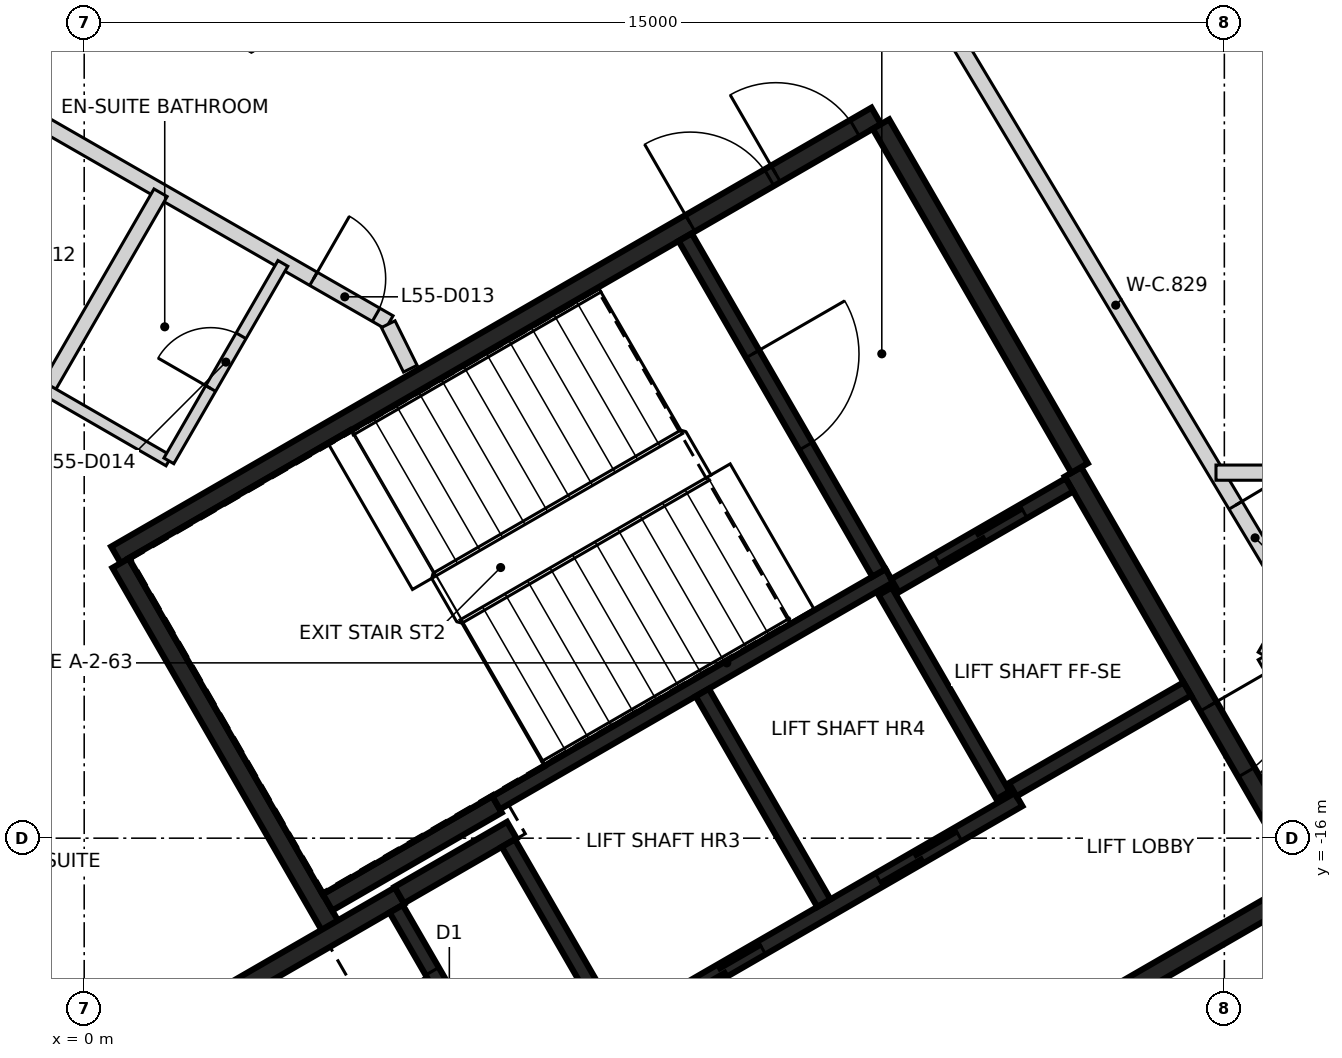
"""IFC4 building model, lengths in metres.
Left out: names, types, materials, properties, quantities, classifications, styles, units other than length and angle.
Written with IfcOpenShell. Run it as: python <this file> out.ifc"""

import sys

from ifc_helpers import new_model, si_unit, direction, frame, frame_2d, origin, place, context, subcontext, project, spatial, rectangle, extrude, element, fill, save


model = new_model("IFC4")
c1 = context("Model", 3, precision=1e-05, world=origin(), true_north=direction((0.0, 1.0)))
c2 = subcontext(c1, "Body", "Model", "MODEL_VIEW")
j1 = project(units=[si_unit("LENGTHUNIT", "METRE"), si_unit("PLANEANGLEUNIT", "RADIAN")], contexts=[c1])
p1 = place(None, origin())
s1 = spatial("IfcSite", under=j1, at=p1, CompositionType="ELEMENT")
p2 = place(p1, origin())
s2 = spatial("IfcBuilding", under=s1, at=p2, CompositionType="ELEMENT")
p3 = place(p2, frame((0.0, 0.0, 221.4)))
s3 = spatial("IfcBuildingStorey", under=s2, at=p3, CompositionType="ELEMENT", Elevation=221.4)
p4 = place(p3, frame((0.417, -12.273, 0.0), z_axis=(0.0, 0.0, 1.0), x_axis=(0.866021906294, 0.500006057782, 0.0)))
e1 = element("IfcWall", 1, at=p4, inside=s3, PredefinedType="SHEAR", context=c2, shape_type="SweptSolid", body=[
    extrude(rectangle(XDim=11.55, YDim=0.25, at=frame_2d((5.775, 0.0))), origin(), (0.0, 0.0, 1.0), 3.25),
])
p5 = place(p4, frame((10.025, 0.0, 0.0)))
e2 = element("IfcOpeningElement", 2, at=p5, cuts=e1, PredefinedType="OPENING", context=c2, shape_type="SweptSolid", body=[
    extrude(rectangle(XDim=1.2, YDim=2.1, at=frame_2d((0.6, 1.05))), frame((0.0, 0.135, 0.0), z_axis=(0.0, -1.0, 0.0), x_axis=(1.0, 0.0, 0.0)), (0.0, 0.0, 1.0), 0.27),
])
p6 = place(p4, frame((8.725, 0.0, 0.0)))
e3 = element("IfcOpeningElement", 3, at=p6, cuts=e1, PredefinedType="OPENING", context=c2, shape_type="SweptSolid", body=[
    extrude(rectangle(XDim=1.2, YDim=2.1, at=frame_2d((0.6, 1.05))), frame((0.0, 0.135, 0.0), z_axis=(0.0, -1.0, 0.0), x_axis=(1.0, 0.0, 0.0)), (0.0, 0.0, 1.0), 0.27),
])
p7 = place(p3, frame((16.133, -16.594, 0.0), z_axis=(0.0, 0.0, 1.0), x_axis=(-0.866022959057, -0.500004234368, 0.0)))
e4 = element("IfcWall", 4, at=p7, inside=s3, PredefinedType="SHEAR", context=c2, shape_type="SweptSolid", body=[
    extrude(rectangle(XDim=8.75, YDim=0.25, at=frame_2d((4.375, 0.0))), origin(), (0.0, 0.0, 1.0), 3.25),
])
p8 = place(p3, frame((13.008, -11.181, 0.0), z_axis=(0.0, 0.0, 1.0), x_axis=(0.500001955336, -0.866024274868, 0.0)))
e5 = element("IfcWall", 5, at=p8, inside=s3, PredefinedType="SHEAR", context=c2, shape_type="SweptSolid", body=[
    extrude(rectangle(XDim=6.125, YDim=0.25, at=frame_2d((3.062, 0.0))), origin(), (0.0, 0.0, 1.0), 3.25),
])
p9 = place(p8, frame((3.563, 0.0, 0.0)))
e6 = element("IfcOpeningElement", 6, at=p9, cuts=e5, PredefinedType="OPENING", context=c2, shape_type="SweptSolid", body=[
    extrude(rectangle(XDim=1.0, YDim=2.1, at=frame_2d((0.5, 1.05))), frame((0.0, 0.135, 0.0), z_axis=(0.0, -1.0, 0.0), x_axis=(1.0, 0.0, 0.0)), (0.0, 0.0, 1.0), 0.27),
])
p10 = place(p3, frame((3.235, -17.153, 0.0), z_axis=(0.0, 0.0, 1.0), x_axis=(-0.500008851346, 0.866020293397, 0.0)))
e7 = element("IfcWall", 7, at=p10, inside=s3, PredefinedType="SHEAR", context=c2, shape_type="SweptSolid", body=[
    extrude(rectangle(XDim=5.51, YDim=0.25, at=frame_2d((2.755, 0.0))), origin(), (0.0, 0.0, 1.0), 3.25),
])
p11 = place(p3, frame((10.483, -6.606, 0.0), z_axis=(0.0, 0.0, 1.0), x_axis=(0.49999885962, -0.866026062182, 0.0)))
e8 = element("IfcWall", 8, at=p11, inside=s3, PredefinedType="SHEAR", context=c2, shape_type="SweptSolid", body=[
    extrude(rectangle(XDim=5.225, YDim=0.25, at=frame_2d((2.612, 0.0))), origin(), (0.0, 0.0, 1.0), 3.25),
])
p12 = place(p3, frame((1.669, -18.19, 0.0), z_axis=(0.0, 0.0, 1.0), x_axis=(0.866042235819, 0.499970844928, 0.0)))
e9 = element("IfcWall", 9, at=p12, inside=s3, PredefinedType="SHEAR", context=c2, shape_type="SweptSolid", body=[
    extrude(rectangle(XDim=2.865, YDim=0.25, at=frame_2d((1.432, 0.0))), origin(), (0.0, 0.0, 1.0), 3.25),
])
p13 = place(p3, frame((5.431, -15.556, 0.0), z_axis=(0.0, 0.0, 1.0), x_axis=(-0.866022940537, -0.500004266446, 0.0)))
e10 = element("IfcWall", 10, at=p13, inside=s3, PredefinedType="SHEAR", context=c2, shape_type="SweptSolid", body=[
    extrude(rectangle(XDim=2.575, YDim=0.25, at=frame_2d((1.287, 0.0))), origin(), (0.0, 0.0, 1.0), 3.25),
])
p14 = place(p3, frame((4.145, -16.749, 0.0), z_axis=(0.0, 0.0, 1.0), x_axis=(0.866038183914, 0.499977863513, 0.0)))
e11 = element("IfcWall", 11, at=p14, inside=s3, PredefinedType="SHEAR", context=c2, shape_type="SweptSolid", body=[
    extrude(rectangle(XDim=1.71, YDim=0.25, at=frame_2d((0.855, 0.0))), origin(), (0.0, 0.0, 1.0), 3.25),
])
p15 = place(p3, frame((5.419, -15.534, 0.0), z_axis=(0.0, 0.0, 1.0), x_axis=(0.866029065029, 0.499993658486, 0.0)))
e12 = element("IfcWall", 12, at=p15, inside=s3, PredefinedType="SHEAR", context=c2, shape_type="SweptSolid", body=[
    extrude(rectangle(XDim=5.974, YDim=0.2, at=frame_2d((2.987, 0.0))), origin(), (0.0, 0.0, 1.0), 3.25),
])
p16 = place(p3, frame((7.01, -18.542, 0.0), z_axis=(0.0, 0.0, 1.0), x_axis=(0.866030299012, 0.499991521122, 0.0)))
e13 = element("IfcWall", 13, at=p16, inside=s3, PredefinedType="SHEAR", context=c2, shape_type="SweptSolid", body=[
    extrude(rectangle(XDim=6.1, YDim=0.2, at=frame_2d((3.05, 0.0))), origin(), (0.0, 0.0, 1.0), 3.25),
])
p17 = place(p16, frame((1.0, 0.0, 0.0)))
e14 = element("IfcOpeningElement", 14, at=p17, cuts=e13, PredefinedType="OPENING", context=c2, shape_type="SweptSolid", body=[
    extrude(rectangle(XDim=1.2, YDim=2.1, at=frame_2d((0.6, 1.05))), frame((0.0, 0.11, 0.0), z_axis=(0.0, -1.0, 0.0), x_axis=(1.0, 0.0, 0.0)), (0.0, 0.0, 1.0), 0.22),
])
p18 = place(p16, frame((3.982, 0.0, 0.0)))
e15 = element("IfcOpeningElement", 15, at=p18, cuts=e13, PredefinedType="OPENING", context=c2, shape_type="SweptSolid", body=[
    extrude(rectangle(XDim=1.2, YDim=2.1, at=frame_2d((0.6, 1.05))), frame((0.0, 0.11, 0.0), z_axis=(0.0, -1.0, 0.0), x_axis=(1.0, 0.0, 0.0)), (0.0, 0.0, 1.0), 0.22),
])
p19 = place(p3, frame((7.906, -8.094, 0.0), z_axis=(0.0, 0.0, 1.0), x_axis=(0.500027839223, -0.866009330205, 0.0)))
e16 = element("IfcWall", 16, at=p19, inside=s3, PredefinedType="SHEAR", context=c2, shape_type="SweptSolid", body=[
    extrude(rectangle(XDim=5.098, YDim=0.2, at=frame_2d((2.549, 0.0))), origin(), (0.0, 0.0, 1.0), 3.25),
])
p20 = place(p19, frame((1.774, 0.0, 0.0)))
e17 = element("IfcOpeningElement", 17, at=p20, cuts=e16, PredefinedType="OPENING", context=c2, shape_type="SweptSolid", body=[
    extrude(rectangle(XDim=1.4, YDim=2.1, at=frame_2d((0.7, 1.05))), frame((0.0, 0.11, 0.0), z_axis=(0.0, -1.0, 0.0), x_axis=(1.0, 0.0, 0.0)), (0.0, 0.0, 1.0), 0.22),
])
p21 = place(p3, frame((8.132, -14.084, 0.0), z_axis=(0.0, 0.0, 1.0), x_axis=(0.499997778408, -0.866026686418, 0.0)))
e18 = element("IfcWall", 18, at=p21, inside=s3, PredefinedType="SHEAR", context=c2, shape_type="SweptSolid", body=[
    extrude(rectangle(XDim=3.198, YDim=0.2, at=frame_2d((1.599, 0.0))), origin(), (0.0, 0.0, 1.0), 3.25),
])
p22 = place(p3, frame((5.503, -19.352, 0.0), z_axis=(0.0, 0.0, 1.0), x_axis=(-0.499986818241, 0.866033014143, 0.0)))
e19 = element("IfcWall", 19, at=p22, inside=s3, PredefinedType="SHEAR", context=c2, shape_type="SweptSolid", body=[
    extrude(rectangle(XDim=2.798, YDim=0.2, at=frame_2d((1.399, 0.0))), origin(), (0.0, 0.0, 1.0), 3.25),
])
p23 = place(p22, frame((0.949, 0.0, 0.0)))
e20 = element("IfcOpeningElement", 20, at=p23, cuts=e19, PredefinedType="OPENING", context=c2, shape_type="SweptSolid", body=[
    extrude(rectangle(XDim=0.9, YDim=2.1, at=frame_2d((0.45, 1.05))), frame((0.0, 0.11, 0.0), z_axis=(0.0, -1.0, 0.0), x_axis=(1.0, 0.0, 0.0)), (0.0, 0.0, 1.0), 0.22),
])
p24 = place(p3, frame((6.96, -18.455, 0.0), z_axis=(0.0, 0.0, 1.0), x_axis=(-0.499926705758, 0.866067716099, 0.0)))
e21 = element("IfcWall", 21, at=p24, inside=s3, PredefinedType="SHEAR", context=c2, shape_type="SweptSolid", body=[
    extrude(rectangle(XDim=2.759, YDim=0.2, at=frame_2d((1.38, 0.0))), origin(), (0.0, 0.0, 1.0), 3.25),
])
p25 = place(p3, frame((12.088, -15.437, 0.0), z_axis=(0.0, 0.0, 1.0), x_axis=(-0.500026960575, 0.86600983753, 0.0)))
e22 = element("IfcWall", 22, at=p25, inside=s3, PredefinedType="SHEAR", context=c2, shape_type="SweptSolid", body=[
    extrude(rectangle(XDim=3.1, YDim=0.2, at=frame_2d((1.55, 0.0))), origin(), (0.0, 0.0, 1.0), 3.25),
])
p26 = place(p3, frame((10.666, -12.678, 0.0), z_axis=(0.0, 0.0, 1.0), x_axis=(0.866018407898, 0.500012117035, 0.0)))
e23 = element("IfcWall", 23, at=p26, inside=s3, PredefinedType="SHEAR", context=c2, shape_type="SweptSolid", body=[
    extrude(rectangle(XDim=2.651, YDim=0.2, at=frame_2d((1.325, 0.0))), origin(), (0.0, 0.0, 1.0), 3.25),
])
p27 = place(p26, frame((0.652, 0.0, 0.0)))
e24 = element("IfcOpeningElement", 24, at=p27, cuts=e23, PredefinedType="OPENING", context=c2, shape_type="SweptSolid", body=[
    extrude(rectangle(XDim=1.3, YDim=2.1, at=frame_2d((0.65, 1.05))), frame((0.0, 0.11, 0.0), z_axis=(0.0, -1.0, 0.0), x_axis=(1.0, 0.0, 0.0)), (0.0, 0.0, 1.0), 0.22),
])
p28 = place(p3, frame((14.512, -14.037, 0.0), z_axis=(0.0, 0.0, 1.0), x_axis=(-0.866018407898, -0.500012117035, 0.0)))
e25 = element("IfcWall", 25, at=p28, inside=s3, PredefinedType="SHEAR", context=c2, shape_type="SweptSolid", body=[
    extrude(rectangle(XDim=2.651, YDim=0.2, at=frame_2d((1.325, 0.0))), origin(), (0.0, 0.0, 1.0), 3.25),
])
p29 = place(p3, frame((-7.089, -2.836, 0.0), z_axis=(0.0, 0.0, 1.0), x_axis=(0.867106243364, -0.498123240493, 0.0)))
e26 = element("IfcWall", 26, at=p29, inside=s3, PredefinedType="PARTITIONING", context=c2, shape_type="SweptSolid", body=[
    extrude(rectangle(XDim=12.804, YDim=0.2, at=frame_2d((6.402, 0.0))), origin(), (0.0, 0.0, 1.0), 3.25),
])
p30 = place(p29, frame((1.909, 0.0, 0.0)))
e27 = element("IfcOpeningElement", 27, at=p30, cuts=e26, PredefinedType="OPENING", context=c2, shape_type="SweptSolid", body=[
    extrude(rectangle(XDim=1.0, YDim=2.1, at=frame_2d((0.5, 1.05))), frame((0.0, 0.11, 0.0), z_axis=(0.0, -1.0, 0.0), x_axis=(1.0, 0.0, 0.0)), (0.0, 0.0, 1.0), 0.22),
])
p31 = place(p29, frame((4.91, 0.0, 0.0)))
e28 = element("IfcOpeningElement", 28, at=p31, cuts=e26, PredefinedType="OPENING", context=c2, shape_type="SweptSolid", body=[
    extrude(rectangle(XDim=0.95, YDim=2.1, at=frame_2d((0.475, 1.05))), frame((0.0, 0.11, 0.0), z_axis=(0.0, -1.0, 0.0), x_axis=(1.0, 0.0, 0.0)), (0.0, 0.0, 1.0), 0.22),
])
p32 = place(p29, frame((11.654, 0.0, 0.0)))
e29 = element("IfcOpeningElement", 29, at=p32, cuts=e26, PredefinedType="OPENING", context=c2, shape_type="SweptSolid", body=[
    extrude(rectangle(XDim=0.95, YDim=2.1, at=frame_2d((0.475, 1.05))), frame((0.0, 0.11, 0.0), z_axis=(0.0, -1.0, 0.0), x_axis=(1.0, 0.0, 0.0)), (0.0, 0.0, 1.0), 0.22),
])
p33 = place(p3, frame((4.0, -9.238, 0.0), z_axis=(0.0, 0.0, 1.0), x_axis=(0.444370954227, -0.89584287408, 0.0)))
e30 = element("IfcWall", 30, at=p33, inside=s3, PredefinedType="PARTITIONING", context=c2, shape_type="SweptSolid", body=[
    extrude(rectangle(XDim=0.653, YDim=0.2, at=frame_2d((0.327, 0.0))), origin(), (0.0, 0.0, 1.0), 3.25),
])
p34 = place(p3, frame((11.217, -5.058, 0.0), z_axis=(0.0, 0.0, 1.0), x_axis=(0.513856906336, -0.857875911662, 0.0)))
e31 = element("IfcWall", 31, at=p34, inside=s3, PredefinedType="PARTITIONING", context=c2, shape_type="SweptSolid", body=[
    extrude(rectangle(XDim=9.163, YDim=0.2, at=frame_2d((4.581, 0.0))), origin(), (0.0, 0.0, 1.0), 3.25),
])
p35 = place(p34, frame((7.65, 0.0, 0.0)))
e32 = element("IfcOpeningElement", 32, at=p35, cuts=e31, PredefinedType="OPENING", context=c2, shape_type="SweptSolid", body=[
    extrude(rectangle(XDim=1.0, YDim=2.1, at=frame_2d((0.5, 1.05))), frame((0.0, 0.11, 0.0), z_axis=(0.0, -1.0, 0.0), x_axis=(1.0, 0.0, 0.0)), (0.0, 0.0, 1.0), 0.22),
])
p36 = place(p3, frame((15.55, -15.213, 0.0), z_axis=(0.0, 0.0, 1.0), x_axis=(0.865989998118, 0.500061319399, 0.0)))
e33 = element("IfcWall", 33, at=p36, inside=s3, PredefinedType="PARTITIONING", context=c2, shape_type="SweptSolid", body=[
    extrude(rectangle(XDim=0.79, YDim=0.2, at=frame_2d((0.395, 0.0))), origin(), (0.0, 0.0, 1.0), 2.35),
])
p37 = place(p3, frame((15.532, -13.603, 0.0), z_axis=(0.0, 0.0, 1.0), x_axis=(0.498203662485, 0.867060038686, 0.0)))
e34 = element("IfcWall", 34, at=p37, inside=s3, PredefinedType="PARTITIONING", context=c2, shape_type="SweptSolid", body=[
    extrude(rectangle(XDim=0.789, YDim=0.2, at=frame_2d((0.395, 0.0))), origin(), (0.0, 0.0, 1.0), 3.25),
])
p38 = place(p3, frame((15.532, -13.603, 0.0), z_axis=(0.0, 0.0, 1.0), x_axis=(0.500199332748, -0.865910288378, 0.0)))
e35 = element("IfcWall", 35, at=p38, inside=s3, PredefinedType="PARTITIONING", context=c2, shape_type="SweptSolid", body=[
    extrude(rectangle(XDim=1.403, YDim=0.2, at=frame_2d((0.702, 0.0))), origin(), (0.0, 0.0, 1.0), 2.35),
])
p39 = place(p3, frame((-5.097, -18.078, 0.0), z_axis=(0.0, 0.0, 1.0), x_axis=(0.499960272111, 0.866048339477, 0.0)))
e36 = element("IfcWall", 36, at=p39, inside=s3, PredefinedType="PARTITIONING", context=c2, shape_type="SweptSolid", body=[
    extrude(rectangle(XDim=12.204, YDim=0.2, at=frame_2d((6.102, 0.0))), origin(), (0.0, 0.0, 1.0), 3.25),
])
p40 = place(p3, frame((14.89, -11.191, 0.0), z_axis=(0.0, 0.0, 1.0), x_axis=(1.0, 0.0, 0.0)))
e37 = element("IfcWall", 37, at=p40, inside=s3, PredefinedType="PARTITIONING", context=c2, shape_type="SweptSolid", body=[
    extrude(rectangle(XDim=3.142, YDim=0.2, at=frame_2d((1.571, 0.0))), origin(), (0.0, 0.0, 1.0), 2.35),
])
p41 = place(p3, frame((-2.833, -8.757, 0.0), z_axis=(0.0, 0.0, 1.0), x_axis=(0.866002713795, -0.500039298155, 0.0)))
e38 = element("IfcWall", 38, at=p41, inside=s3, PredefinedType="PARTITIONING", context=c2, shape_type="SweptSolid", body=[
    extrude(rectangle(XDim=4.558, YDim=0.15, at=frame_2d((2.279, 0.0))), origin(), (0.0, 0.0, 1.0), 3.25),
])
p42 = place(p3, frame((1.114, -11.036, 0.0), z_axis=(0.0, 0.0, 1.0), x_axis=(0.50002537861, 0.866010750942, 0.0)))
e39 = element("IfcWall", 39, at=p42, inside=s3, PredefinedType="PARTITIONING", context=c2, shape_type="SweptSolid", body=[
    extrude(rectangle(XDim=3.0, YDim=0.15, at=frame_2d((1.5, 0.0))), origin(), (0.0, 0.0, 1.0), 3.25),
])
p43 = place(p42, frame((1.1, 0.0, 0.0)))
e40 = element("IfcOpeningElement", 40, at=p43, cuts=e39, PredefinedType="OPENING", context=c2, shape_type="SweptSolid", body=[
    extrude(rectangle(XDim=0.8, YDim=2.1, at=frame_2d((0.4, 1.05))), frame((0.0, 0.085, 0.0), z_axis=(0.0, -1.0, 0.0), x_axis=(1.0, 0.0, 0.0)), (0.0, 0.0, 1.0), 0.17),
])
p44 = place(p27, origin())
e41 = element("IfcDoor", 41, at=p44, inside=s3, OperationType="SLIDING_TO_RIGHT", PredefinedType="DOOR", context=c2, shape_type="SweptSolid", body=[
    extrude(rectangle(XDim=1.3, YDim=2.1, at=frame_2d((0.65, 1.05))), frame((0.0, 0.025, 0.0), z_axis=(0.0, -1.0, 0.0), x_axis=(1.0, 0.0, 0.0)), (0.0, 0.0, 1.0), 0.05),
])
fill(e24, e41)
p45 = place(p17, origin())
e42 = element("IfcDoor", 42, at=p45, inside=s3, OperationType="DOUBLE_DOOR_SLIDING", PredefinedType="DOOR", context=c2, shape_type="SweptSolid", body=[
    extrude(rectangle(XDim=1.2, YDim=2.1, at=frame_2d((0.6, 1.05))), frame((0.0, 0.025, 0.0), z_axis=(0.0, -1.0, 0.0), x_axis=(1.0, 0.0, 0.0)), (0.0, 0.0, 1.0), 0.05),
])
fill(e14, e42)
p46 = place(p18, origin())
e43 = element("IfcDoor", 43, at=p46, inside=s3, OperationType="DOUBLE_DOOR_SLIDING", PredefinedType="DOOR", context=c2, shape_type="SweptSolid", body=[
    extrude(rectangle(XDim=1.2, YDim=2.1, at=frame_2d((0.6, 1.05))), frame((0.0, 0.025, 0.0), z_axis=(0.0, -1.0, 0.0), x_axis=(1.0, 0.0, 0.0)), (0.0, 0.0, 1.0), 0.05),
])
fill(e15, e43)
p47 = place(p9, origin())
e44 = element("IfcDoor", 44, at=p47, inside=s3, OperationType="SINGLE_SWING_LEFT", PredefinedType="DOOR", context=c2, shape_type="SweptSolid", body=[
    extrude(rectangle(XDim=1.0, YDim=2.1, at=frame_2d((0.5, 1.05))), frame((0.0, 0.025, 0.0), z_axis=(0.0, -1.0, 0.0), x_axis=(1.0, 0.0, 0.0)), (0.0, 0.0, 1.0), 0.05),
])
fill(e6, e44)
p48 = place(p5, origin())
e45 = element("IfcDoor", 45, at=p48, inside=s3, OperationType="SINGLE_SWING_LEFT", PredefinedType="DOOR", context=c2, shape_type="SweptSolid", body=[
    extrude(rectangle(XDim=1.2, YDim=2.1, at=frame_2d((0.6, 1.05))), frame((0.0, 0.025, 0.0), z_axis=(0.0, -1.0, 0.0), x_axis=(1.0, 0.0, 0.0)), (0.0, 0.0, 1.0), 0.05),
])
fill(e2, e45)
p49 = place(p6, origin())
e46 = element("IfcDoor", 46, at=p49, inside=s3, OperationType="SINGLE_SWING_RIGHT", PredefinedType="DOOR", context=c2, shape_type="SweptSolid", body=[
    extrude(rectangle(XDim=1.2, YDim=2.1, at=frame_2d((0.6, 1.05))), frame((0.0, 0.025, 0.0), z_axis=(0.0, -1.0, 0.0), x_axis=(1.0, 0.0, 0.0)), (0.0, 0.0, 1.0), 0.05),
])
fill(e3, e46)
p50 = place(p20, origin())
e47 = element("IfcDoor", 47, at=p50, inside=s3, OperationType="SINGLE_SWING_RIGHT", PredefinedType="DOOR", context=c2, shape_type="SweptSolid", body=[
    extrude(rectangle(XDim=1.4, YDim=2.1, at=frame_2d((0.7, 1.05))), frame((0.0, 0.025, 0.0), z_axis=(0.0, -1.0, 0.0), x_axis=(1.0, 0.0, 0.0)), (0.0, 0.0, 1.0), 0.05),
])
fill(e17, e47)
p51 = place(p23, origin())
e48 = element("IfcDoor", 48, at=p51, inside=s3, OperationType="SINGLE_SWING_LEFT", PredefinedType="DOOR", context=c2, shape_type="SweptSolid", body=[
    extrude(rectangle(XDim=0.9, YDim=2.1, at=frame_2d((0.45, 1.05))), frame((0.0, 0.025, 0.0), z_axis=(0.0, -1.0, 0.0), x_axis=(1.0, 0.0, 0.0)), (0.0, 0.0, 1.0), 0.05),
])
fill(e20, e48)
p52 = place(p32, frame((0.95, 0.0, 0.0), z_axis=(0.0, 0.0, 1.0), x_axis=(-1.0, 0.0, 0.0)))
e49 = element("IfcDoor", 49, at=p52, inside=s3, OperationType="SINGLE_SWING_LEFT", PredefinedType="DOOR", context=c2, shape_type="SweptSolid", body=[
    extrude(rectangle(XDim=0.95, YDim=2.1, at=frame_2d((0.475, 1.05))), frame((0.0, 0.025, 0.0), z_axis=(0.0, -1.0, 0.0), x_axis=(1.0, 0.0, 0.0)), (0.0, 0.0, 1.0), 0.05),
])
fill(e29, e49)
p53 = place(p43, origin())
e50 = element("IfcDoor", 50, at=p53, inside=s3, OperationType="SINGLE_SWING_LEFT", PredefinedType="DOOR", context=c2, shape_type="SweptSolid", body=[
    extrude(rectangle(XDim=0.8, YDim=2.1, at=frame_2d((0.4, 1.05))), frame((0.0, 0.025, 0.0), z_axis=(0.0, -1.0, 0.0), x_axis=(1.0, 0.0, 0.0)), (0.0, 0.0, 1.0), 0.05),
])
fill(e40, e50)
p54 = place(p35, frame((1.0, 0.0, 0.0), z_axis=(0.0, 0.0, 1.0), x_axis=(-1.0, 0.0, 0.0)))
e51 = element("IfcDoor", 51, at=p54, inside=s3, OperationType="SINGLE_SWING_LEFT", PredefinedType="DOOR", context=c2, shape_type="SweptSolid", body=[
    extrude(rectangle(XDim=1.0, YDim=2.1, at=frame_2d((0.5, 1.05))), frame((0.0, 0.025, 0.0), z_axis=(0.0, -1.0, 0.0), x_axis=(1.0, 0.0, 0.0)), (0.0, 0.0, 1.0), 0.05),
])
fill(e32, e51)
save(model, sys.argv[1])
